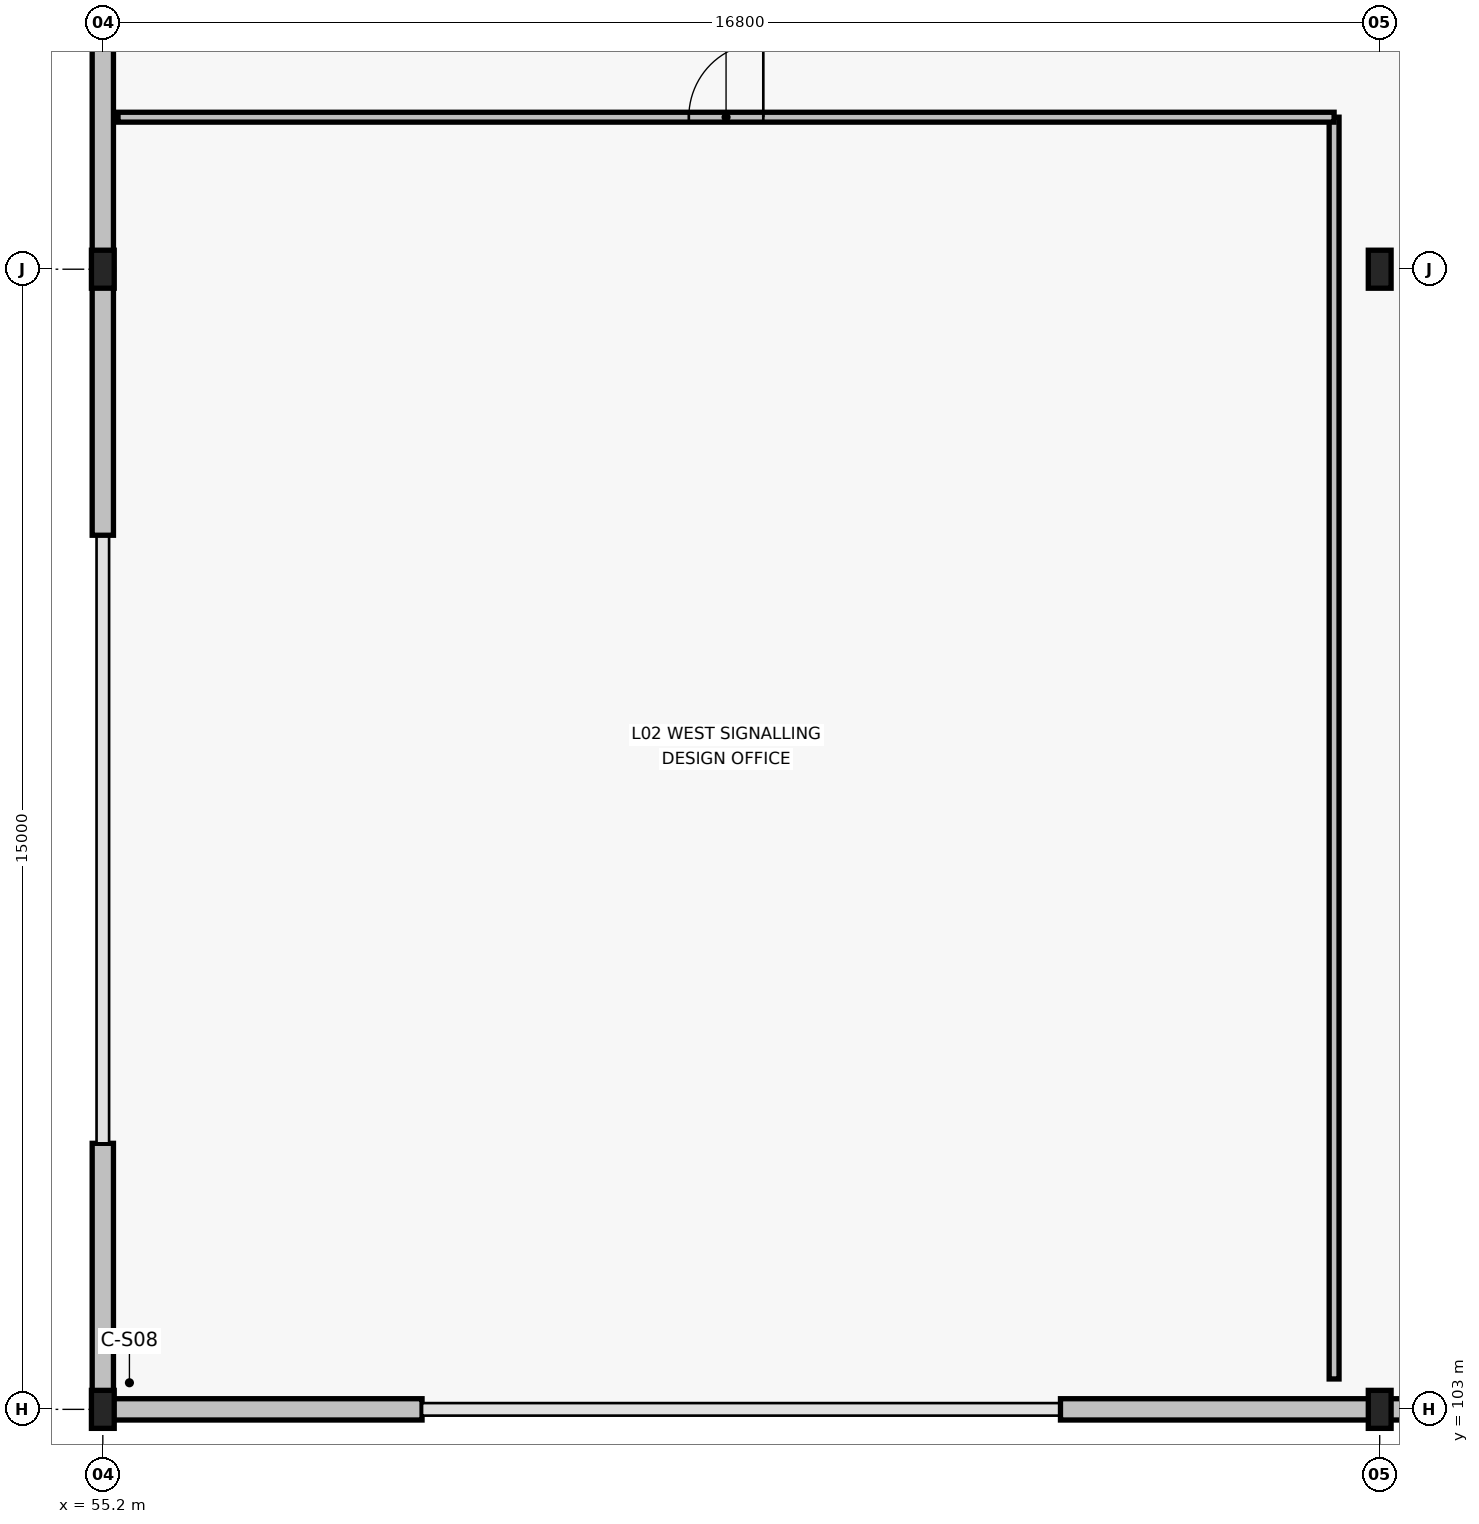
"""IFC4 building model, lengths in metres.
Left out: names, types, materials, properties, quantities, classifications, styles, units other than length and angle.
Written with IfcOpenShell. Run it as: python <this file> out.ifc"""

import sys

from ifc_helpers import new_model, si_unit, direction, frame, frame_2d, origin, origin_2d, place, context, subcontext, project, spatial, rectangle, i_section, extrude, element, fill, save


model = new_model("IFC4")
c1 = context("Model", 3, precision=1e-05, world=origin(), true_north=direction((0.0, 1.0)))
c2 = subcontext(c1, "Body", "Model", "MODEL_VIEW")
j1 = project(units=[si_unit("LENGTHUNIT", "METRE"), si_unit("PLANEANGLEUNIT", "RADIAN")], contexts=[c1])
p1 = place(None, origin())
s1 = spatial("IfcSite", under=j1, at=p1, CompositionType="ELEMENT")
p2 = place(p1, origin())
s2 = spatial("IfcBuilding", under=s1, at=p2, CompositionType="ELEMENT")
p3 = place(p2, frame((0.0, 0.0, 10.8)))
s3 = spatial("IfcBuildingStorey", under=s2, at=p3, CompositionType="ELEMENT", Elevation=10.8)
for number, where, z_axis, x_axis in (
    (1, (55.2, 103.0, 0.0), (0.0, 0.0, 1.0), (1.0, 0.0, 0.0)),
    (2, (55.2, 118.0, 0.0), (0.0, 0.0, 1.0), (1.0, 0.0, 0.0)),
    (3, (72.0, 103.0, 0.0), (0.0, 0.0, 1.0), (1.0, 0.0, 0.0)),
    (4, (72.0, 118.0, 0.0), (0.0, 0.0, 1.0), (1.0, 0.0, 0.0)),
):
    element("IfcColumn", number, at=place(p3, frame(where, z_axis=z_axis, x_axis=x_axis)), inside=s3, PredefinedType="COLUMN", context=c2, shape_type="SweptSolid", body=[
        extrude(i_section(OverallWidth=0.3, OverallDepth=0.5, WebThickness=0.014, FlangeThickness=0.028, FilletRadius=0.027, at=origin_2d()), origin(), (0.0, 0.0, 1.0), 6.0),
    ])
for number, where, z_axis, x_axis in (
    (5, (55.2, 103.0, 0.0), (0.0, 0.0, 1.0), (1.0, 0.0, 0.0)),
    (6, (67.8, 103.0, 0.0), (0.0, 0.0, 1.0), (1.0, 0.0, 0.0)),
):
    element("IfcWall", number, at=place(p3, frame(where, z_axis=z_axis, x_axis=x_axis)), inside=s3, PredefinedType="STANDARD", context=c2, shape_type="SweptSolid", body=[
        extrude(rectangle(XDim=4.2, YDim=0.28, at=frame_2d((2.1, 0.0))), origin(), (0.0, 0.0, 1.0), 5.405),
    ])
p4 = place(p3, frame((72.0, 103.0, 0.0), z_axis=(0.0, 0.0, 1.0), x_axis=(1.0, 0.0, 0.0)))
e7 = element("IfcWall", 7, at=p4, inside=s3, PredefinedType="STANDARD", context=c2, shape_type="SweptSolid", body=[
    extrude(rectangle(XDim=4.2, YDim=0.28, at=frame_2d((2.1, 0.0))), origin(), (0.0, 0.0, 1.0), 5.325),
])
p5 = place(p3, frame((55.2, 103.14, 0.0), z_axis=(0.0, 0.0, 1.0), x_axis=(0.0, 1.0, 0.0)))
e8 = element("IfcWall", 8, at=p5, inside=s3, PredefinedType="STANDARD", context=c2, shape_type="SweptSolid", body=[
    extrude(rectangle(XDim=3.36, YDim=0.28, at=frame_2d((1.68, 0.0))), origin(), (0.0, 0.0, 1.0), 5.405),
])
for number, where, z_axis, x_axis in (
    (9, (55.2, 114.5, 0.0), (0.0, 0.0, 1.0), (0.0, 1.0, 0.0)),
    (10, (55.2, 118.0, 0.0), (0.0, 0.0, 1.0), (0.0, 1.0, 0.0)),
):
    element("IfcWall", number, at=place(p3, frame(where, z_axis=z_axis, x_axis=x_axis)), inside=s3, PredefinedType="STANDARD", context=c2, shape_type="SweptSolid", body=[
        extrude(rectangle(XDim=3.5, YDim=0.28, at=frame_2d((1.75, 0.0))), origin(), (0.0, 0.0, 1.0), 5.405),
    ])
p6 = place(p3, frame((71.4, 103.4, 0.0), z_axis=(0.0, 0.0, 1.0), x_axis=(0.0, 1.0, 0.0)))
e11 = element("IfcWall", 11, at=p6, inside=s3, PredefinedType="PARTITIONING", context=c2, shape_type="SweptSolid", body=[
    extrude(rectangle(XDim=16.6, YDim=0.13, at=frame_2d((8.3, 0.0))), origin(), (0.0, 0.0, 1.0), 5.295),
])
p7 = place(p3, frame((71.4, 120.0, 0.0), z_axis=(0.0, 0.0, 1.0), x_axis=(-1.0, 0.0, 0.0)))
e12 = element("IfcWall", 12, at=p7, inside=s3, PredefinedType="PARTITIONING", context=c2, shape_type="SweptSolid", body=[
    extrude(rectangle(XDim=16.0, YDim=0.13, at=frame_2d((8.0, 0.0))), origin(), (0.0, 0.0, 1.0), 5.8),
])
p8 = place(p7, frame((8.49, 0.0, 0.0), z_axis=(0.0, 0.0, 1.0), x_axis=(-1.0, 0.0, 0.0)))
e13 = element("IfcOpeningElement", 13, at=p8, cuts=e12, PredefinedType="OPENING", context=c2, shape_type="SweptSolid", body=[
    extrude(rectangle(XDim=0.98, YDim=2.1, at=frame_2d((0.49, 1.05))), frame((0.0, 0.075, 0.0), z_axis=(0.0, -1.0, 0.0), x_axis=(1.0, 0.0, 0.0)), (0.0, 0.0, 1.0), 0.15),
])
p9 = place(p8, origin())
e14 = element("IfcDoor", 14, at=p9, inside=s3, OperationType="SINGLE_SWING_LEFT", PredefinedType="DOOR", context=c2, shape_type="SweptSolid", body=[
    extrude(rectangle(XDim=0.98, YDim=2.1, at=frame_2d((0.49, 1.05))), frame((0.0, 0.025, 0.0), z_axis=(0.0, -1.0, 0.0), x_axis=(1.0, 0.0, 0.0)), (0.0, 0.0, 1.0), 0.05),
])
fill(e13, e14)
save(model, sys.argv[1])
